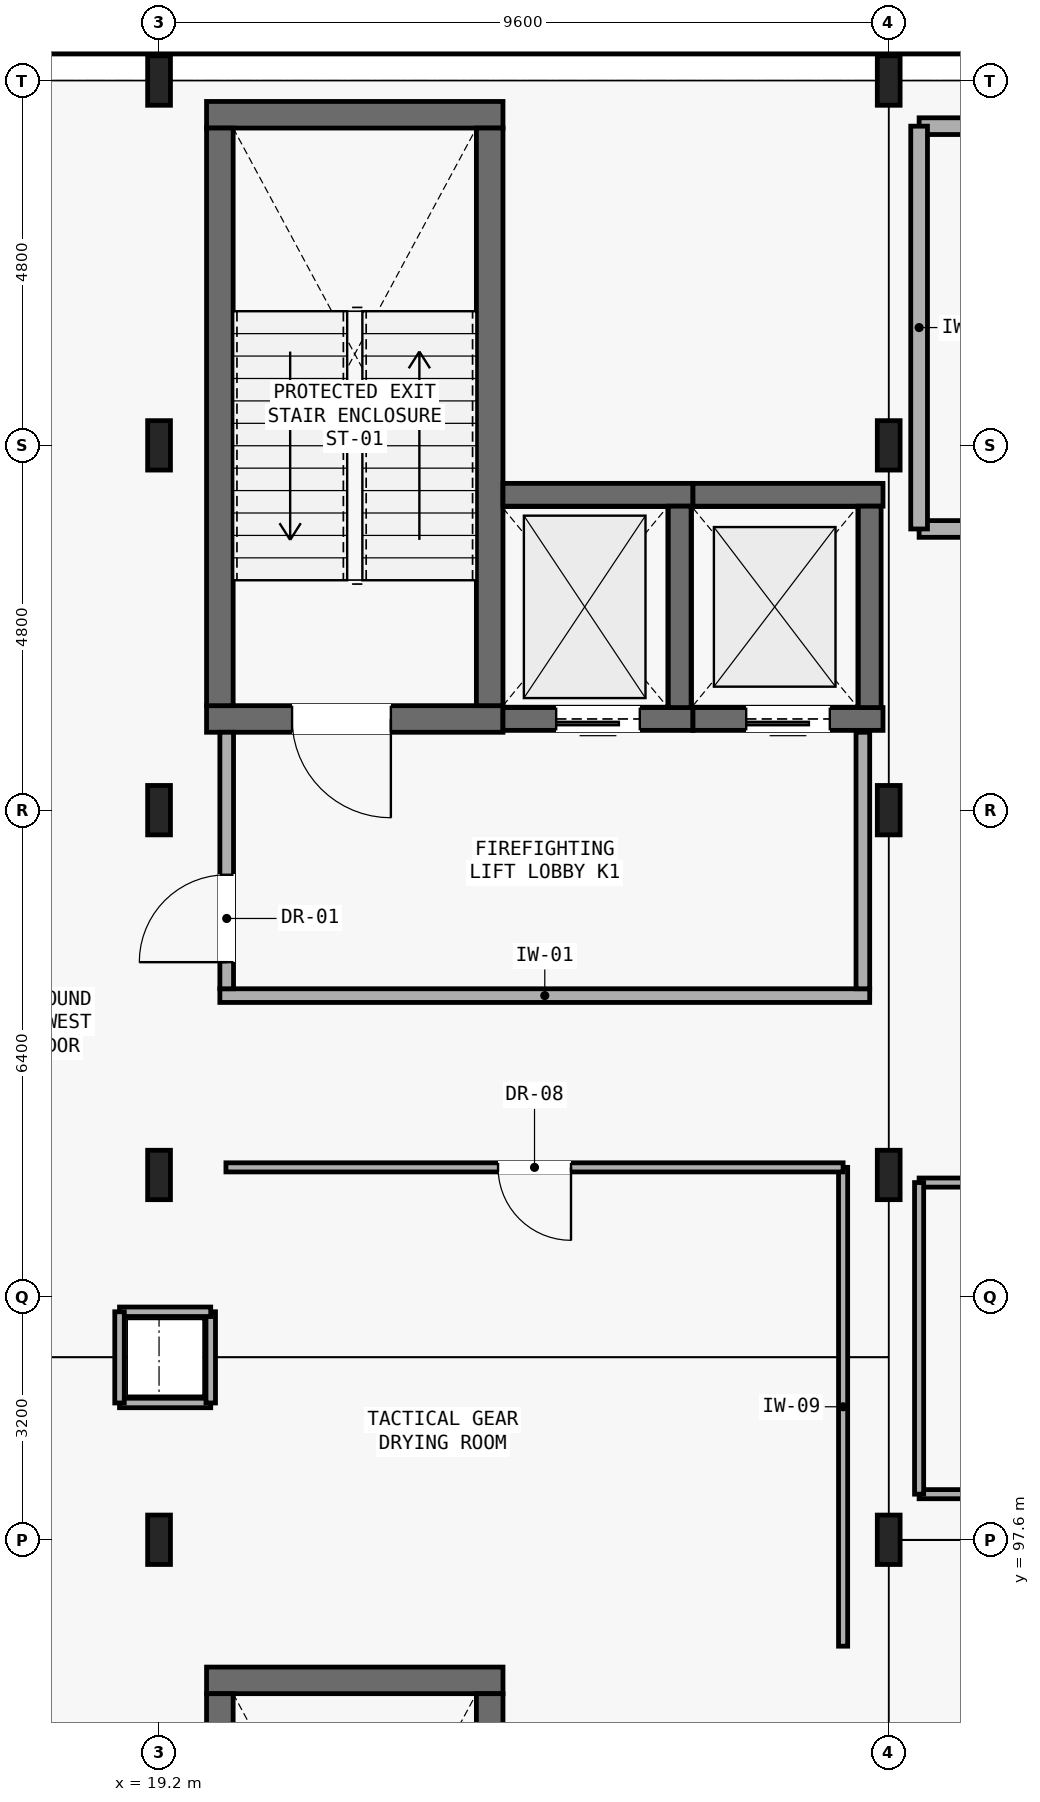
"""IFC4 building model, lengths in metres.
Left out: names, types, materials, properties, quantities, classifications, styles, units other than length and angle.
Written with IfcOpenShell. Run it as: python <this file> out.ifc"""

import sys

from ifc_helpers import new_model, si_unit, direction, frame, frame_2d, origin, origin_2d, place, context, subcontext, project, spatial, rectangle, i_section, extrude, element, fill, save


model = new_model("IFC4")
c1 = context("Model", 3, precision=1e-05, world=origin(), true_north=direction((0.0, 1.0)))
c2 = subcontext(c1, "Body", "Model", "MODEL_VIEW")
j1 = project(units=[si_unit("LENGTHUNIT", "METRE"), si_unit("PLANEANGLEUNIT", "RADIAN")], contexts=[c1])
p1 = place(None, origin())
s1 = spatial("IfcSite", under=j1, at=p1, CompositionType="ELEMENT")
p2 = place(p1, origin())
s2 = spatial("IfcBuilding", under=s1, at=p2, CompositionType="ELEMENT")
p3 = place(p2, frame((0.0, 0.0, -4.55)))
s3 = spatial("IfcBuildingStorey", under=s2, at=p3, CompositionType="ELEMENT", Elevation=-4.55)
for number, where, z_axis, x_axis in (
    (1, (28.8, 97.6, 0.0), (0.0, 0.0, 1.0), (1.0, 0.0, 0.0)),
    (2, (28.8, 102.4, 0.0), (0.0, 0.0, 1.0), (1.0, 0.0, 0.0)),
    (3, (28.8, 107.2, 0.0), (0.0, 0.0, 1.0), (1.0, 0.0, 0.0)),
    (4, (28.8, 112.0, 0.0), (0.0, 0.0, 1.0), (1.0, 0.0, 0.0)),
    (5, (28.8, 116.8, 0.0), (0.0, 0.0, 1.0), (1.0, 0.0, 0.0)),
    (6, (19.2, 116.8, 0.0), (0.0, 0.0, 1.0), (1.0, 0.0, 0.0)),
    (7, (19.2, 97.6, 0.0), (0.0, 0.0, 1.0), (1.0, 0.0, 0.0)),
    (8, (19.2, 102.4, 0.0), (0.0, 0.0, 1.0), (1.0, 0.0, 0.0)),
    (9, (19.2, 107.2, 0.0), (0.0, 0.0, 1.0), (1.0, 0.0, 0.0)),
    (10, (19.2, 112.0, 0.0), (0.0, 0.0, 1.0), (1.0, 0.0, 0.0)),
):
    element("IfcColumn", number, at=place(p3, frame(where, z_axis=z_axis, x_axis=x_axis)), inside=s3, PredefinedType="COLUMN", context=c2, shape_type="SweptSolid", body=[
        extrude(i_section(OverallWidth=0.3, OverallDepth=0.65, WebThickness=0.016, FlangeThickness=0.031, FilletRadius=0.027, at=origin_2d()), origin(), (0.0, 0.0, 1.0), 4.55),
    ])
p4 = place(p3, frame((-0.55, 117.35, 0.0), z_axis=(0.0, 0.0, 1.0), x_axis=(1.0, 0.0, 0.0)))
e11 = element("IfcWall", 11, at=p4, inside=s3, PredefinedType="USERDEFINED", context=c2, shape_type="SweptSolid", body=[
    extrude(rectangle(XDim=87.5, YDim=0.4, at=frame_2d((43.75, 0.0))), origin(), (0.0, 0.0, 1.0), 4.28),
])
p5 = place(p3, frame((19.825, 108.4, 0.0), z_axis=(0.0, 0.0, 1.0), x_axis=(1.0, 0.0, 0.0)))
e12 = element("IfcWall", 12, at=p5, inside=s3, PredefinedType="SHEAR", context=c2, shape_type="SweptSolid", body=[
    extrude(rectangle(XDim=3.9, YDim=0.35, at=frame_2d((1.95, 0.0))), origin(), (0.0, 0.0, 1.0), 4.28),
])
p6 = place(p5, frame((1.125, 0.0, 0.0)))
e13 = element("IfcOpeningElement", 13, at=p6, cuts=e12, PredefinedType="OPENING", context=c2, shape_type="SweptSolid", body=[
    extrude(rectangle(XDim=1.3, YDim=2.15, at=frame_2d((0.65, 1.075))), frame((0.0, 0.185, 0.0), z_axis=(0.0, -1.0, 0.0), x_axis=(1.0, 0.0, 0.0)), (0.0, 0.0, 1.0), 0.37),
])
p7 = place(p3, frame((19.825, 116.35, 0.0), z_axis=(0.0, 0.0, 1.0), x_axis=(1.0, 0.0, 0.0)))
e14 = element("IfcWall", 14, at=p7, inside=s3, PredefinedType="SHEAR", context=c2, shape_type="SweptSolid", body=[
    extrude(rectangle(XDim=3.9, YDim=0.35, at=frame_2d((1.95, 0.0))), origin(), (0.0, 0.0, 1.0), 4.28),
])
for number, where, z_axis, x_axis in (
    (15, (20.0, 108.575, 0.0), (0.0, 0.0, 1.0), (0.0, 1.0, 0.0)),
    (16, (23.55, 108.575, 0.0), (0.0, 0.0, 1.0), (0.0, 1.0, 0.0)),
):
    element("IfcWall", number, at=place(p3, frame(where, z_axis=z_axis, x_axis=x_axis)), inside=s3, PredefinedType="SHEAR", context=c2, shape_type="SweptSolid", body=[
        extrude(rectangle(XDim=7.6, YDim=0.35, at=frame_2d((3.8, 0.0))), origin(), (0.0, 0.0, 1.0), 4.28),
    ])
p8 = place(p3, frame((23.725, 108.4, 0.0), z_axis=(0.0, 0.0, 1.0), x_axis=(1.0, 0.0, 0.0)))
e17 = element("IfcWall", 17, at=p8, inside=s3, PredefinedType="SHEAR", context=c2, shape_type="SweptSolid", body=[
    extrude(rectangle(XDim=2.5, YDim=0.3, at=frame_2d((1.25, 0.0))), origin(), (0.0, 0.0, 1.0), 4.28),
])
p9 = place(p8, frame((0.7, 0.0, 0.0)))
e18 = element("IfcOpeningElement", 18, at=p9, cuts=e17, PredefinedType="OPENING", context=c2, shape_type="SweptSolid", body=[
    extrude(rectangle(XDim=1.1, YDim=2.1, at=frame_2d((0.55, 1.05))), frame((0.0, 0.16, 0.0), z_axis=(0.0, -1.0, 0.0), x_axis=(1.0, 0.0, 0.0)), (0.0, 0.0, 1.0), 0.32),
])
p10 = place(p3, frame((23.725, 111.35, 0.0), z_axis=(0.0, 0.0, 1.0), x_axis=(1.0, 0.0, 0.0)))
e19 = element("IfcWall", 19, at=p10, inside=s3, PredefinedType="SHEAR", context=c2, shape_type="SweptSolid", body=[
    extrude(rectangle(XDim=2.5, YDim=0.3, at=frame_2d((1.25, 0.0))), origin(), (0.0, 0.0, 1.0), 4.28),
])
p11 = place(p3, frame((26.05, 108.55, 0.0), z_axis=(0.0, 0.0, 1.0), x_axis=(0.0, 1.0, 0.0)))
e20 = element("IfcWall", 20, at=p11, inside=s3, PredefinedType="SHEAR", context=c2, shape_type="SweptSolid", body=[
    extrude(rectangle(XDim=2.65, YDim=0.3, at=frame_2d((1.325, 0.0))), origin(), (0.0, 0.0, 1.0), 4.28),
])
p12 = place(p3, frame((26.225, 108.4, 0.0), z_axis=(0.0, 0.0, 1.0), x_axis=(1.0, 0.0, 0.0)))
e21 = element("IfcWall", 21, at=p12, inside=s3, PredefinedType="SHEAR", context=c2, shape_type="SweptSolid", body=[
    extrude(rectangle(XDim=2.5, YDim=0.3, at=frame_2d((1.25, 0.0))), origin(), (0.0, 0.0, 1.0), 4.28),
])
p13 = place(p12, frame((0.7, 0.0, 0.0)))
e22 = element("IfcOpeningElement", 22, at=p13, cuts=e21, PredefinedType="OPENING", context=c2, shape_type="SweptSolid", body=[
    extrude(rectangle(XDim=1.1, YDim=2.1, at=frame_2d((0.55, 1.05))), frame((0.0, 0.16, 0.0), z_axis=(0.0, -1.0, 0.0), x_axis=(1.0, 0.0, 0.0)), (0.0, 0.0, 1.0), 0.32),
])
p14 = place(p3, frame((26.225, 111.35, 0.0), z_axis=(0.0, 0.0, 1.0), x_axis=(1.0, 0.0, 0.0)))
e23 = element("IfcWall", 23, at=p14, inside=s3, PredefinedType="SHEAR", context=c2, shape_type="SweptSolid", body=[
    extrude(rectangle(XDim=2.5, YDim=0.3, at=frame_2d((1.25, 0.0))), origin(), (0.0, 0.0, 1.0), 4.28),
])
p15 = place(p3, frame((28.55, 108.55, 0.0), z_axis=(0.0, 0.0, 1.0), x_axis=(0.0, 1.0, 0.0)))
e24 = element("IfcWall", 24, at=p15, inside=s3, PredefinedType="SHEAR", context=c2, shape_type="SweptSolid", body=[
    extrude(rectangle(XDim=2.65, YDim=0.3, at=frame_2d((1.325, 0.0))), origin(), (0.0, 0.0, 1.0), 4.28),
])
p16 = place(p3, frame((20.0, 104.76, 0.0), z_axis=(0.0, 0.0, 1.0), x_axis=(1.0, 0.0, 0.0)))
e25 = element("IfcWall", 25, at=p16, inside=s3, PredefinedType="PARTITIONING", context=c2, shape_type="SweptSolid", body=[
    extrude(rectangle(XDim=8.55, YDim=0.18, at=frame_2d((4.275, 0.0))), origin(), (0.0, 0.0, 1.0), 3.76),
])
p17 = place(p3, frame((20.09, 104.85, 0.0), z_axis=(0.0, 0.0, 1.0), x_axis=(0.0, 1.0, 0.0)))
e26 = element("IfcWall", 26, at=p17, inside=s3, PredefinedType="PARTITIONING", context=c2, shape_type="SweptSolid", body=[
    extrude(rectangle(XDim=3.375, YDim=0.18, at=frame_2d((1.688, 0.0))), origin(), (0.0, 0.0, 1.0), 4.28),
])
p18 = place(p17, frame((0.35, 0.0, 0.0)))
e27 = element("IfcOpeningElement", 27, at=p18, cuts=e26, PredefinedType="OPENING", context=c2, shape_type="SweptSolid", body=[
    extrude(rectangle(XDim=1.15, YDim=2.15, at=frame_2d((0.575, 1.075))), frame((0.0, 0.1, 0.0), z_axis=(0.0, -1.0, 0.0), x_axis=(1.0, 0.0, 0.0)), (0.0, 0.0, 1.0), 0.2),
])
p19 = place(p3, frame((28.46, 104.85, 0.0), z_axis=(0.0, 0.0, 1.0), x_axis=(0.0, 1.0, 0.0)))
e28 = element("IfcWall", 28, at=p19, inside=s3, PredefinedType="PARTITIONING", context=c2, shape_type="SweptSolid", body=[
    extrude(rectangle(XDim=3.375, YDim=0.18, at=frame_2d((1.688, 0.0))), origin(), (0.0, 0.0, 1.0), 4.28),
])
p20 = place(p3, frame((19.825, 95.75, 0.0), z_axis=(0.0, 0.0, 1.0), x_axis=(1.0, 0.0, 0.0)))
e29 = element("IfcWall", 29, at=p20, inside=s3, PredefinedType="SHEAR", context=c2, shape_type="SweptSolid", body=[
    extrude(rectangle(XDim=3.9, YDim=0.35, at=frame_2d((1.95, 0.0))), origin(), (0.0, 0.0, 1.0), 4.28),
])
for number, where, z_axis, x_axis in (
    (30, (20.0, 87.975, 0.0), (0.0, 0.0, 1.0), (0.0, 1.0, 0.0)),
    (31, (23.55, 87.975, 0.0), (0.0, 0.0, 1.0), (0.0, 1.0, 0.0)),
):
    element("IfcWall", number, at=place(p3, frame(where, z_axis=z_axis, x_axis=x_axis)), inside=s3, PredefinedType="SHEAR", context=c2, shape_type="SweptSolid", body=[
        extrude(rectangle(XDim=7.6, YDim=0.35, at=frame_2d((3.8, 0.0))), origin(), (0.0, 0.0, 1.0), 4.28),
    ])
p21 = place(p3, frame((18.68, 99.4, 0.0), z_axis=(0.0, 0.0, 1.0), x_axis=(1.0, 0.0, 0.0)))
e32 = element("IfcWall", 32, at=p21, inside=s3, PredefinedType="PARTITIONING", context=c2, shape_type="SweptSolid", body=[
    extrude(rectangle(XDim=1.2, YDim=0.125, at=frame_2d((0.6, 0.0))), origin(), (0.0, 0.0, 1.0), 4.28),
])
p22 = place(p3, frame((19.88, 99.4, 0.0), z_axis=(0.0, 0.0, 1.0), x_axis=(0.0, 1.0, 0.0)))
e33 = element("IfcWall", 33, at=p22, inside=s3, PredefinedType="PARTITIONING", context=c2, shape_type="SweptSolid", body=[
    extrude(rectangle(XDim=1.2, YDim=0.125, at=frame_2d((0.6, 0.0))), origin(), (0.0, 0.0, 1.0), 4.28),
])
p23 = place(p3, frame((19.88, 100.6, 0.0), z_axis=(0.0, 0.0, 1.0), x_axis=(-1.0, 0.0, 0.0)))
e34 = element("IfcWall", 34, at=p23, inside=s3, PredefinedType="PARTITIONING", context=c2, shape_type="SweptSolid", body=[
    extrude(rectangle(XDim=1.2, YDim=0.125, at=frame_2d((0.6, 0.0))), origin(), (0.0, 0.0, 1.0), 4.28),
])
p24 = place(p3, frame((18.68, 100.6, 0.0), z_axis=(0.0, 0.0, 1.0), x_axis=(0.0, -1.0, 0.0)))
e35 = element("IfcWall", 35, at=p24, inside=s3, PredefinedType="PARTITIONING", context=c2, shape_type="SweptSolid", body=[
    extrude(rectangle(XDim=1.2, YDim=0.125, at=frame_2d((0.6, 0.0))), origin(), (0.0, 0.0, 1.0), 4.28),
])
p25 = place(p3, frame((28.2, 96.2, 0.0), z_axis=(0.0, 0.0, 1.0), x_axis=(0.0, 1.0, 0.0)))
e36 = element("IfcWall", 36, at=p25, inside=s3, PredefinedType="PARTITIONING", context=c2, shape_type="SweptSolid", body=[
    extrude(rectangle(XDim=6.3, YDim=0.12, at=frame_2d((3.15, 0.0))), origin(), (0.0, 0.0, 1.0), 4.28),
])
p26 = place(p3, frame((28.2, 102.5, 0.0), z_axis=(0.0, 0.0, 1.0), x_axis=(-1.0, 0.0, 0.0)))
e37 = element("IfcWall", 37, at=p26, inside=s3, PredefinedType="PARTITIONING", context=c2, shape_type="SweptSolid", body=[
    extrude(rectangle(XDim=8.12, YDim=0.12, at=frame_2d((4.06, 0.0))), origin(), (0.0, 0.0, 1.0), 3.36),
])
p27 = place(p26, frame((3.58, 0.0, 0.0)))
e38 = element("IfcOpeningElement", 38, at=p27, cuts=e37, PredefinedType="OPENING", context=c2, shape_type="SweptSolid", body=[
    extrude(rectangle(XDim=0.96, YDim=2.08, at=frame_2d((0.48, 1.04))), frame((0.0, 0.07, 0.0), z_axis=(0.0, -1.0, 0.0), x_axis=(1.0, 0.0, 0.0)), (0.0, 0.0, 1.0), 0.14),
])
p28 = place(p3, frame((29.2, 110.9, 0.0), z_axis=(0.0, 0.0, 1.0), x_axis=(1.0, 0.0, 0.0)))
e39 = element("IfcWall", 39, at=p28, inside=s3, PredefinedType="PARTITIONING", context=c2, shape_type="SweptSolid", body=[
    extrude(rectangle(XDim=28.4, YDim=0.22, at=frame_2d((14.2, 0.0))), origin(), (0.0, 0.0, 1.0), 4.28),
])
p29 = place(p28, frame((13.36, 0.0, 0.0)))
e40 = element("IfcOpeningElement", 40, at=p29, cuts=e39, PredefinedType="OPENING", context=c2, shape_type="SweptSolid", body=[
    extrude(rectangle(XDim=1.68, YDim=2.2, at=frame_2d((0.84, 1.1))), frame((0.0, 0.12, 0.0), z_axis=(0.0, -1.0, 0.0), x_axis=(1.0, 0.0, 0.0)), (0.0, 0.0, 1.0), 0.24),
])
p30 = place(p3, frame((57.6, 116.2, 0.0), z_axis=(0.0, 0.0, 1.0), x_axis=(-1.0, 0.0, 0.0)))
e41 = element("IfcWall", 41, at=p30, inside=s3, PredefinedType="PARTITIONING", context=c2, shape_type="SweptSolid", body=[
    extrude(rectangle(XDim=28.4, YDim=0.22, at=frame_2d((14.2, 0.0))), origin(), (0.0, 0.0, 1.0), 4.28),
])
p31 = place(p3, frame((29.2, 116.2, 0.0), z_axis=(0.0, 0.0, 1.0), x_axis=(0.0, -1.0, 0.0)))
e42 = element("IfcWall", 42, at=p31, inside=s3, PredefinedType="PARTITIONING", context=c2, shape_type="SweptSolid", body=[
    extrude(rectangle(XDim=5.3, YDim=0.22, at=frame_2d((2.65, 0.0))), origin(), (0.0, 0.0, 1.0), 4.28),
])
p32 = place(p3, frame((29.2, 98.2, 0.0), z_axis=(0.0, 0.0, 1.0), x_axis=(1.0, 0.0, 0.0)))
e43 = element("IfcWall", 43, at=p32, inside=s3, PredefinedType="PARTITIONING", context=c2, shape_type="SweptSolid", body=[
    extrude(rectangle(XDim=28.4, YDim=0.12, at=frame_2d((14.2, 0.0))), origin(), (0.0, 0.0, 1.0), 4.28),
])
p33 = place(p3, frame((57.6, 102.3, 0.0), z_axis=(0.0, 0.0, 1.0), x_axis=(-1.0, 0.0, 0.0)))
e44 = element("IfcWall", 44, at=p33, inside=s3, PredefinedType="PARTITIONING", context=c2, shape_type="SweptSolid", body=[
    extrude(rectangle(XDim=28.4, YDim=0.12, at=frame_2d((14.2, 0.0))), origin(), (0.0, 0.0, 1.0), 4.28),
])
p34 = place(p33, frame((13.43, 0.0, 0.0)))
e45 = element("IfcOpeningElement", 45, at=p34, cuts=e44, PredefinedType="OPENING", context=c2, shape_type="SweptSolid", body=[
    extrude(rectangle(XDim=1.54, YDim=2.2, at=frame_2d((0.77, 1.1))), frame((0.0, 0.07, 0.0), z_axis=(0.0, -1.0, 0.0), x_axis=(1.0, 0.0, 0.0)), (0.0, 0.0, 1.0), 0.14),
])
p35 = place(p3, frame((29.2, 102.3, 0.0), z_axis=(0.0, 0.0, 1.0), x_axis=(0.0, -1.0, 0.0)))
e46 = element("IfcWall", 46, at=p35, inside=s3, PredefinedType="PARTITIONING", context=c2, shape_type="SweptSolid", body=[
    extrude(rectangle(XDim=4.1, YDim=0.12, at=frame_2d((2.05, 0.0))), origin(), (0.0, 0.0, 1.0), 4.28),
])
p36 = place(p6, frame((1.3, 0.0, 0.0), z_axis=(0.0, 0.0, 1.0), x_axis=(-1.0, 0.0, 0.0)))
e47 = element("IfcDoor", 47, at=p36, inside=s3, OperationType="SINGLE_SWING_RIGHT", PredefinedType="DOOR", context=c2, shape_type="SweptSolid", body=[
    extrude(rectangle(XDim=1.3, YDim=2.15, at=frame_2d((0.65, 1.075))), frame((0.0, 0.025, 0.0), z_axis=(0.0, -1.0, 0.0), x_axis=(1.0, 0.0, 0.0)), (0.0, 0.0, 1.0), 0.05),
])
fill(e13, e47)
p37 = place(p9, frame((1.1, 0.0, 0.0), z_axis=(0.0, 0.0, 1.0), x_axis=(-1.0, 0.0, 0.0)))
e48 = element("IfcDoor", 48, at=p37, inside=s3, OperationType="SLIDING_TO_LEFT", PredefinedType="DOOR", context=c2, shape_type="SweptSolid", body=[
    extrude(rectangle(XDim=1.1, YDim=2.1, at=frame_2d((0.55, 1.05))), frame((0.0, 0.025, 0.0), z_axis=(0.0, -1.0, 0.0), x_axis=(1.0, 0.0, 0.0)), (0.0, 0.0, 1.0), 0.05),
])
fill(e18, e48)
p38 = place(p13, frame((1.1, 0.0, 0.0), z_axis=(0.0, 0.0, 1.0), x_axis=(-1.0, 0.0, 0.0)))
e49 = element("IfcDoor", 49, at=p38, inside=s3, OperationType="SLIDING_TO_LEFT", PredefinedType="DOOR", context=c2, shape_type="SweptSolid", body=[
    extrude(rectangle(XDim=1.1, YDim=2.1, at=frame_2d((0.55, 1.05))), frame((0.0, 0.025, 0.0), z_axis=(0.0, -1.0, 0.0), x_axis=(1.0, 0.0, 0.0)), (0.0, 0.0, 1.0), 0.05),
])
fill(e22, e49)
p39 = place(p18, origin())
e50 = element("IfcDoor", 50, at=p39, inside=s3, OperationType="SINGLE_SWING_LEFT", PredefinedType="DOOR", context=c2, shape_type="SweptSolid", body=[
    extrude(rectangle(XDim=1.15, YDim=2.15, at=frame_2d((0.575, 1.075))), frame((0.0, 0.025, 0.0), z_axis=(0.0, -1.0, 0.0), x_axis=(1.0, 0.0, 0.0)), (0.0, 0.0, 1.0), 0.05),
])
fill(e27, e50)
p40 = place(p27, origin())
e51 = element("IfcDoor", 51, at=p40, inside=s3, OperationType="SINGLE_SWING_LEFT", PredefinedType="DOOR", context=c2, shape_type="SweptSolid", body=[
    extrude(rectangle(XDim=0.96, YDim=2.08, at=frame_2d((0.48, 1.04))), frame((0.0, 0.025, 0.0), z_axis=(0.0, -1.0, 0.0), x_axis=(1.0, 0.0, 0.0)), (0.0, 0.0, 1.0), 0.05),
])
fill(e38, e51)
save(model, sys.argv[1])
